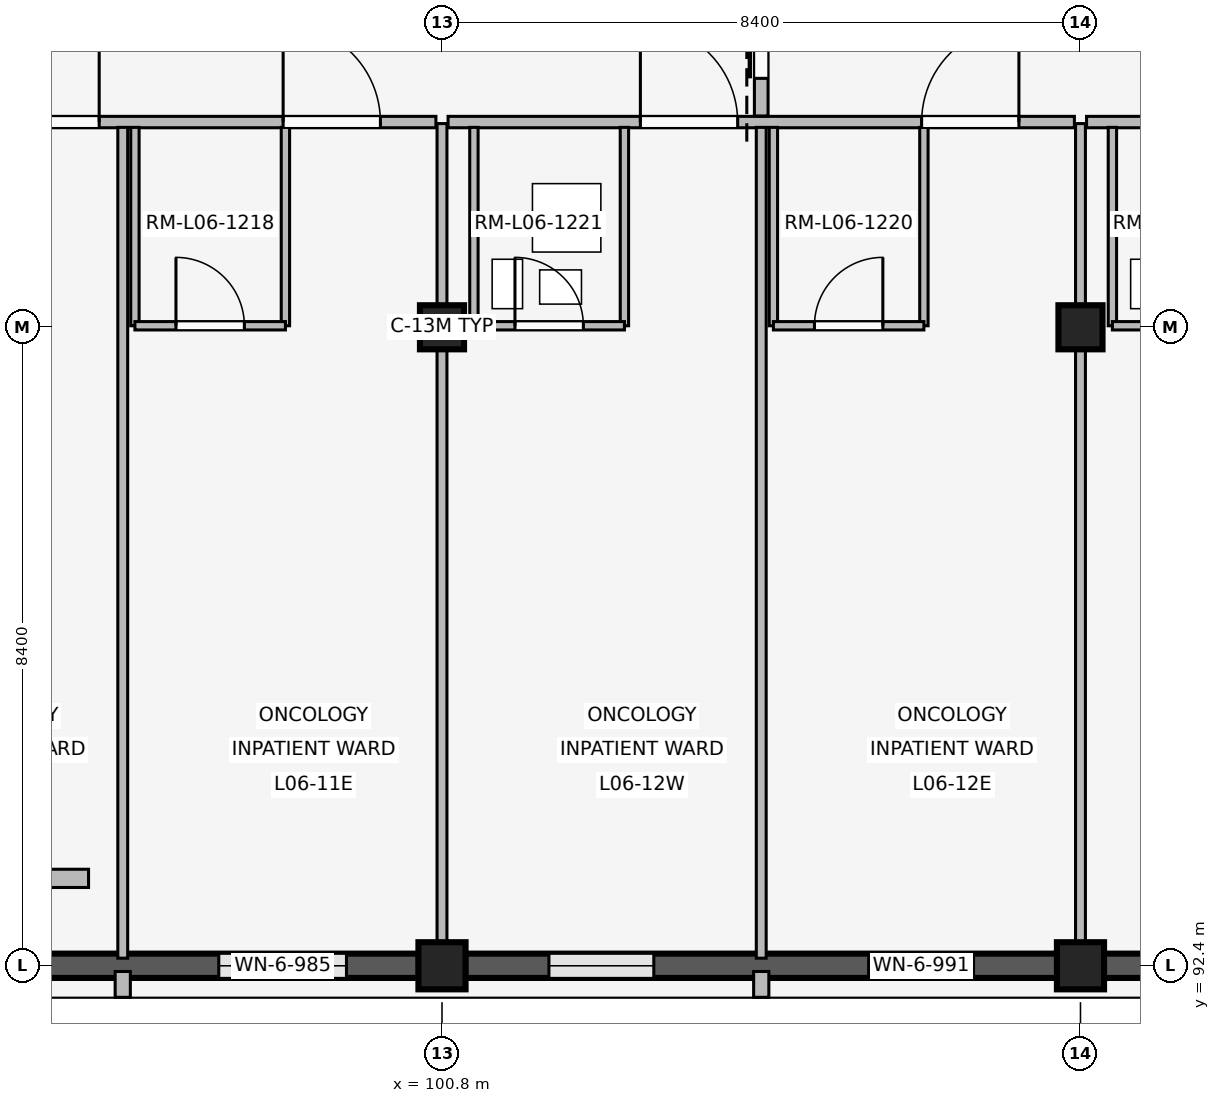
"""IFC4 building model, lengths in metres.
Left out: names, types, materials, properties, quantities, classifications, styles, units other than length and angle.
Written with IfcOpenShell. Run it as: python <this file> out.ifc"""

import sys

from ifc_helpers import new_model, si_unit, direction, frame, frame_2d, origin, origin_2d, place, context, subcontext, project, spatial, rectangle, extrude, element, fill, save


model = new_model("IFC4")
c1 = context("Model", 3, precision=1e-05, world=origin(), true_north=direction((0.0, 1.0)))
c2 = subcontext(c1, "Body", "Model", "MODEL_VIEW")
j1 = project(units=[si_unit("LENGTHUNIT", "METRE"), si_unit("PLANEANGLEUNIT", "RADIAN")], contexts=[c1])
p1 = place(None, origin())
s1 = spatial("IfcSite", under=j1, at=p1, CompositionType="ELEMENT")
p2 = place(p1, origin())
s2 = spatial("IfcBuilding", under=s1, at=p2, CompositionType="ELEMENT")
p3 = place(p2, frame((0.0, 0.0, 24.6)))
s3 = spatial("IfcBuildingStorey", under=s2, at=p3, CompositionType="ELEMENT", Elevation=24.6)
p4 = place(p3, frame((100.8, 92.4, 0.0), z_axis=(0.0, 0.0, 1.0), x_axis=(1.0, 0.0, 0.0)))
e1 = element("IfcColumn", 1, at=p4, inside=s3, PredefinedType="COLUMN", context=c2, shape_type="SweptSolid", body=[
    extrude(rectangle(XDim=0.62, YDim=0.62, at=origin_2d()), origin(), (0.0, 0.0, 1.0), 4.2),
])
p5 = place(p3, frame((100.8, 100.8, 0.0), z_axis=(0.0, 0.0, 1.0), x_axis=(1.0, 0.0, 0.0)))
e2 = element("IfcColumn", 2, at=p5, inside=s3, PredefinedType="COLUMN", context=c2, shape_type="SweptSolid", body=[
    extrude(rectangle(XDim=0.58, YDim=0.58, at=origin_2d()), origin(), (0.0, 0.0, 1.0), 4.2),
])
p6 = place(p3, frame((109.2, 92.4, 0.0), z_axis=(0.0, 0.0, 1.0), x_axis=(1.0, 0.0, 0.0)))
e3 = element("IfcColumn", 3, at=p6, inside=s3, PredefinedType="COLUMN", context=c2, shape_type="SweptSolid", body=[
    extrude(rectangle(XDim=0.62, YDim=0.62, at=origin_2d()), origin(), (0.0, 0.0, 1.0), 4.2),
])
p7 = place(p3, frame((109.2, 100.8, 0.0), z_axis=(0.0, 0.0, 1.0), x_axis=(1.0, 0.0, 0.0)))
e4 = element("IfcColumn", 4, at=p7, inside=s3, PredefinedType="COLUMN", context=c2, shape_type="SweptSolid", body=[
    extrude(rectangle(XDim=0.58, YDim=0.58, at=origin_2d()), origin(), (0.0, 0.0, 1.0), 4.2),
])
p8 = place(p3, frame((100.495, 92.4, 0.0), z_axis=(0.0, 0.0, 1.0), x_axis=(-1.0, 0.0, 0.0)))
e5 = element("IfcWall", 5, at=p8, inside=s3, PredefinedType="SOLIDWALL", context=c2, shape_type="SweptSolid", body=[
    extrude(rectangle(XDim=7.79, YDim=0.32, at=frame_2d((3.895, 0.0))), origin(), (0.0, 0.0, 1.0), 3.34),
])
p9 = place(p8, frame((0.952, 0.0, 0.85)))
e6 = element("IfcOpeningElement", 6, at=p9, cuts=e5, PredefinedType="OPENING", context=c2, shape_type="SweptSolid", body=[
    extrude(rectangle(XDim=1.68, YDim=2.05, at=frame_2d((0.84, 1.025))), frame((0.0, 0.17, 0.0), z_axis=(0.0, -1.0, 0.0), x_axis=(1.0, 0.0, 0.0)), (0.0, 0.0, 1.0), 0.34),
])
p10 = place(p8, frame((5.158, 0.0, 0.85)))
e7 = element("IfcOpeningElement", 7, at=p10, cuts=e5, PredefinedType="OPENING", context=c2, shape_type="SweptSolid", body=[
    extrude(rectangle(XDim=1.68, YDim=2.05, at=frame_2d((0.84, 1.025))), frame((0.0, 0.17, 0.0), z_axis=(0.0, -1.0, 0.0), x_axis=(1.0, 0.0, 0.0)), (0.0, 0.0, 1.0), 0.34),
])
p11 = place(p3, frame((96.6, 92.325, 0.0), z_axis=(0.0, 0.0, 1.0), x_axis=(0.0, -1.0, 0.0)))
e8 = element("IfcWall", 8, at=p11, inside=s3, PredefinedType="ELEMENTEDWALL", context=c2, shape_type="SweptSolid", body=[
    extrude(rectangle(XDim=0.34, YDim=0.2, at=frame_2d((0.17, 0.0))), origin(), (0.0, 0.0, 1.0), 3.32),
])
p12 = place(p3, frame((108.895, 92.4, 0.0), z_axis=(0.0, 0.0, 1.0), x_axis=(-1.0, 0.0, 0.0)))
e9 = element("IfcWall", 9, at=p12, inside=s3, PredefinedType="SOLIDWALL", context=c2, shape_type="SweptSolid", body=[
    extrude(rectangle(XDim=7.79, YDim=0.32, at=frame_2d((3.895, 0.0))), origin(), (0.0, 0.0, 1.0), 3.34),
])
p13 = place(p12, frame((1.102, 0.0, 0.85)))
e10 = element("IfcOpeningElement", 10, at=p13, cuts=e9, PredefinedType="OPENING", context=c2, shape_type="SweptSolid", body=[
    extrude(rectangle(XDim=1.38, YDim=1.5, at=frame_2d((0.69, 0.75))), frame((0.0, 0.17, 0.0), z_axis=(0.0, -1.0, 0.0), x_axis=(1.0, 0.0, 0.0)), (0.0, 0.0, 1.0), 0.34),
])
p14 = place(p12, frame((5.308, 0.0, 0.85)))
e11 = element("IfcOpeningElement", 11, at=p14, cuts=e9, PredefinedType="OPENING", context=c2, shape_type="SweptSolid", body=[
    extrude(rectangle(XDim=1.38, YDim=1.5, at=frame_2d((0.69, 0.75))), frame((0.0, 0.17, 0.0), z_axis=(0.0, -1.0, 0.0), x_axis=(1.0, 0.0, 0.0)), (0.0, 0.0, 1.0), 0.34),
])
p15 = place(p3, frame((105.0, 92.325, 0.0), z_axis=(0.0, 0.0, 1.0), x_axis=(0.0, -1.0, 0.0)))
e12 = element("IfcWall", 12, at=p15, inside=s3, PredefinedType="ELEMENTEDWALL", context=c2, shape_type="SweptSolid", body=[
    extrude(rectangle(XDim=0.34, YDim=0.2, at=frame_2d((0.17, 0.0))), origin(), (0.0, 0.0, 1.0), 3.32),
])
p16 = place(p3, frame((117.295, 92.4, 0.0), z_axis=(0.0, 0.0, 1.0), x_axis=(-1.0, 0.0, 0.0)))
e13 = element("IfcWall", 13, at=p16, inside=s3, PredefinedType="SOLIDWALL", context=c2, shape_type="SweptSolid", body=[
    extrude(rectangle(XDim=7.79, YDim=0.32, at=frame_2d((3.895, 0.0))), origin(), (0.0, 0.0, 1.0), 3.34),
])
p17 = place(p16, frame((1.012, 0.0, 0.85)))
e14 = element("IfcOpeningElement", 14, at=p17, cuts=e13, PredefinedType="OPENING", context=c2, shape_type="SweptSolid", body=[
    extrude(rectangle(XDim=1.56, YDim=1.7, at=frame_2d((0.78, 0.85))), frame((0.0, 0.17, 0.0), z_axis=(0.0, -1.0, 0.0), x_axis=(1.0, 0.0, 0.0)), (0.0, 0.0, 1.0), 0.34),
])
p18 = place(p16, frame((5.218, 0.0, 0.85)))
e15 = element("IfcOpeningElement", 15, at=p18, cuts=e13, PredefinedType="OPENING", context=c2, shape_type="SweptSolid", body=[
    extrude(rectangle(XDim=1.56, YDim=1.7, at=frame_2d((0.78, 0.85))), frame((0.0, 0.17, 0.0), z_axis=(0.0, -1.0, 0.0), x_axis=(1.0, 0.0, 0.0)), (0.0, 0.0, 1.0), 0.34),
])
p19 = place(p3, frame((92.76, 103.5, 0.0), z_axis=(0.0, 0.0, 1.0), x_axis=(1.0, 0.0, 0.0)))
e16 = element("IfcWall", 16, at=p19, inside=s3, PredefinedType="PARTITIONING", context=c2, shape_type="SweptSolid", body=[
    extrude(rectangle(XDim=7.96, YDim=0.15, at=frame_2d((3.98, 0.0))), origin(), (0.0, 0.0, 1.0), 3.32),
])
p20 = place(p19, frame((2.25, 0.0, 0.0)))
e17 = element("IfcOpeningElement", 17, at=p20, cuts=e16, PredefinedType="OPENING", context=c2, shape_type="SweptSolid", body=[
    extrude(rectangle(XDim=1.28, YDim=2.2, at=frame_2d((0.64, 1.1))), frame((0.0, 0.085, 0.0), z_axis=(0.0, -1.0, 0.0), x_axis=(1.0, 0.0, 0.0)), (0.0, 0.0, 1.0), 0.17),
])
p21 = place(p19, frame((5.95, 0.0, 0.0)))
e18 = element("IfcOpeningElement", 18, at=p21, cuts=e16, PredefinedType="OPENING", context=c2, shape_type="SweptSolid", body=[
    extrude(rectangle(XDim=1.28, YDim=2.2, at=frame_2d((0.64, 1.1))), frame((0.0, 0.085, 0.0), z_axis=(0.0, -1.0, 0.0), x_axis=(1.0, 0.0, 0.0)), (0.0, 0.0, 1.0), 0.17),
])
p22 = place(p3, frame((96.6, 92.5, 0.0), z_axis=(0.0, 0.0, 1.0), x_axis=(0.0, 1.0, 0.0)))
e19 = element("IfcWall", 19, at=p22, inside=s3, PredefinedType="PARTITIONING", context=c2, shape_type="SweptSolid", body=[
    extrude(rectangle(XDim=10.93, YDim=0.13, at=frame_2d((5.465, 0.0))), origin(), (0.0, 0.0, 1.0), 3.32),
])
for number, where, z_axis, x_axis in (
    (20, (96.76, 100.82, 0.0), (0.0, 0.0, 1.0), (0.0, 1.0, 0.0)),
    (21, (98.74, 100.82, 0.0), (0.0, 0.0, 1.0), (0.0, 1.0, 0.0)),
):
    element("IfcWall", number, at=place(p3, frame(where, z_axis=z_axis, x_axis=x_axis)), inside=s3, PredefinedType="PARTITIONING", context=c2, shape_type="SweptSolid", body=[
        extrude(rectangle(XDim=2.61, YDim=0.11, at=frame_2d((1.305, 0.0))), origin(), (0.0, 0.0, 1.0), 3.32),
    ])
p23 = place(p3, frame((96.76, 100.82, 0.0), z_axis=(0.0, 0.0, 1.0), x_axis=(1.0, 0.0, 0.0)))
e22 = element("IfcWall", 22, at=p23, inside=s3, PredefinedType="PARTITIONING", context=c2, shape_type="SweptSolid", body=[
    extrude(rectangle(XDim=1.98, YDim=0.11, at=frame_2d((0.99, 0.0))), origin(), (0.0, 0.0, 1.0), 3.32),
])
p24 = place(p23, frame((0.54, 0.0, 0.0)))
e23 = element("IfcOpeningElement", 23, at=p24, cuts=e22, PredefinedType="OPENING", context=c2, shape_type="SweptSolid", body=[
    extrude(rectangle(XDim=0.9, YDim=2.1, at=frame_2d((0.45, 1.05))), frame((0.0, 0.065, 0.0), z_axis=(0.0, -1.0, 0.0), x_axis=(1.0, 0.0, 0.0)), (0.0, 0.0, 1.0), 0.13),
])
p25 = place(p3, frame((95.25, 93.55, 0.0), z_axis=(0.0, 0.0, 1.0), x_axis=(1.0, 0.0, 0.0)))
e24 = element("IfcWall", 24, at=p25, inside=s3, PredefinedType="PLUMBINGWALL", context=c2, shape_type="SweptSolid", body=[
    extrude(rectangle(XDim=0.9, YDim=0.24, at=frame_2d((0.45, 0.0))), origin(), (0.0, 0.0, 1.0), 3.32),
])
p26 = place(p3, frame((100.8, 92.54, 0.0), z_axis=(0.0, 0.0, 1.0), x_axis=(0.0, 1.0, 0.0)))
e25 = element("IfcWall", 25, at=p26, inside=s3, PredefinedType="PARTITIONING", context=c2, shape_type="SweptSolid", body=[
    extrude(rectangle(XDim=10.94, YDim=0.13, at=frame_2d((5.47, 0.0))), origin(), (0.0, 0.0, 1.0), 3.32),
])
p27 = place(p3, frame((100.88, 103.5, 0.0), z_axis=(0.0, 0.0, 1.0), x_axis=(1.0, 0.0, 0.0)))
e26 = element("IfcWall", 26, at=p27, inside=s3, PredefinedType="PARTITIONING", context=c2, shape_type="SweptSolid", body=[
    extrude(rectangle(XDim=8.24, YDim=0.15, at=frame_2d((4.12, 0.0))), origin(), (0.0, 0.0, 1.0), 3.32),
])
p28 = place(p27, frame((2.53, 0.0, 0.0)))
e27 = element("IfcOpeningElement", 27, at=p28, cuts=e26, PredefinedType="OPENING", context=c2, shape_type="SweptSolid", body=[
    extrude(rectangle(XDim=1.28, YDim=2.2, at=frame_2d((0.64, 1.1))), frame((0.0, 0.085, 0.0), z_axis=(0.0, -1.0, 0.0), x_axis=(1.0, 0.0, 0.0)), (0.0, 0.0, 1.0), 0.17),
])
p29 = place(p27, frame((6.23, 0.0, 0.0)))
e28 = element("IfcOpeningElement", 28, at=p29, cuts=e26, PredefinedType="OPENING", context=c2, shape_type="SweptSolid", body=[
    extrude(rectangle(XDim=1.28, YDim=2.2, at=frame_2d((0.64, 1.1))), frame((0.0, 0.085, 0.0), z_axis=(0.0, -1.0, 0.0), x_axis=(1.0, 0.0, 0.0)), (0.0, 0.0, 1.0), 0.17),
])
p30 = place(p3, frame((105.0, 92.5, 0.0), z_axis=(0.0, 0.0, 1.0), x_axis=(0.0, 1.0, 0.0)))
e29 = element("IfcWall", 29, at=p30, inside=s3, PredefinedType="PARTITIONING", context=c2, shape_type="SweptSolid", body=[
    extrude(rectangle(XDim=10.93, YDim=0.13, at=frame_2d((5.465, 0.0))), origin(), (0.0, 0.0, 1.0), 3.32),
])
for number, where, z_axis, x_axis in (
    (30, (101.22, 100.82, 0.0), (0.0, 0.0, 1.0), (0.0, 1.0, 0.0)),
    (31, (103.2, 100.82, 0.0), (0.0, 0.0, 1.0), (0.0, 1.0, 0.0)),
):
    element("IfcWall", number, at=place(p3, frame(where, z_axis=z_axis, x_axis=x_axis)), inside=s3, PredefinedType="PARTITIONING", context=c2, shape_type="SweptSolid", body=[
        extrude(rectangle(XDim=2.61, YDim=0.11, at=frame_2d((1.305, 0.0))), origin(), (0.0, 0.0, 1.0), 3.32),
    ])
p31 = place(p3, frame((101.22, 100.82, 0.0), z_axis=(0.0, 0.0, 1.0), x_axis=(1.0, 0.0, 0.0)))
e32 = element("IfcWall", 32, at=p31, inside=s3, PredefinedType="PARTITIONING", context=c2, shape_type="SweptSolid", body=[
    extrude(rectangle(XDim=1.98, YDim=0.11, at=frame_2d((0.99, 0.0))), origin(), (0.0, 0.0, 1.0), 3.32),
])
p32 = place(p31, frame((0.54, 0.0, 0.0)))
e33 = element("IfcOpeningElement", 33, at=p32, cuts=e32, PredefinedType="OPENING", context=c2, shape_type="SweptSolid", body=[
    extrude(rectangle(XDim=0.9, YDim=2.1, at=frame_2d((0.45, 1.05))), frame((0.0, 0.065, 0.0), z_axis=(0.0, -1.0, 0.0), x_axis=(1.0, 0.0, 0.0)), (0.0, 0.0, 1.0), 0.13),
])
for number, where, z_axis, x_axis in (
    (34, (105.16, 100.82, 0.0), (0.0, 0.0, 1.0), (0.0, 1.0, 0.0)),
    (35, (107.14, 100.82, 0.0), (0.0, 0.0, 1.0), (0.0, 1.0, 0.0)),
):
    element("IfcWall", number, at=place(p3, frame(where, z_axis=z_axis, x_axis=x_axis)), inside=s3, PredefinedType="PARTITIONING", context=c2, shape_type="SweptSolid", body=[
        extrude(rectangle(XDim=2.61, YDim=0.11, at=frame_2d((1.305, 0.0))), origin(), (0.0, 0.0, 1.0), 3.32),
    ])
p33 = place(p3, frame((105.16, 100.82, 0.0), z_axis=(0.0, 0.0, 1.0), x_axis=(1.0, 0.0, 0.0)))
e36 = element("IfcWall", 36, at=p33, inside=s3, PredefinedType="PARTITIONING", context=c2, shape_type="SweptSolid", body=[
    extrude(rectangle(XDim=1.98, YDim=0.11, at=frame_2d((0.99, 0.0))), origin(), (0.0, 0.0, 1.0), 3.32),
])
p34 = place(p33, frame((0.54, 0.0, 0.0)))
e37 = element("IfcOpeningElement", 37, at=p34, cuts=e36, PredefinedType="OPENING", context=c2, shape_type="SweptSolid", body=[
    extrude(rectangle(XDim=0.9, YDim=2.1, at=frame_2d((0.45, 1.05))), frame((0.0, 0.065, 0.0), z_axis=(0.0, -1.0, 0.0), x_axis=(1.0, 0.0, 0.0)), (0.0, 0.0, 1.0), 0.13),
])
p35 = place(p3, frame((105.0, 103.58, 0.0), z_axis=(0.0, 0.0, 1.0), x_axis=(0.0, 1.0, 0.0)))
e38 = element("IfcWall", 38, at=p35, inside=s3, PredefinedType="PARTITIONING", context=c2, shape_type="SweptSolid", body=[
    extrude(rectangle(XDim=2.84, YDim=0.18, at=frame_2d((1.42, 0.0))), origin(), (0.0, 0.0, 1.0), 3.32),
])
p36 = place(p35, frame((0.495, 0.0, 0.0)))
e39 = element("IfcOpeningElement", 39, at=p36, cuts=e38, PredefinedType="OPENING", context=c2, shape_type="SweptSolid", body=[
    extrude(rectangle(XDim=1.85, YDim=2.3, at=frame_2d((0.925, 1.15))), frame((0.0, 0.1, 0.0), z_axis=(0.0, -1.0, 0.0), x_axis=(1.0, 0.0, 0.0)), (0.0, 0.0, 1.0), 0.2),
])
p37 = place(p3, frame((109.2, 92.54, 0.0), z_axis=(0.0, 0.0, 1.0), x_axis=(0.0, 1.0, 0.0)))
e40 = element("IfcWall", 40, at=p37, inside=s3, PredefinedType="PARTITIONING", context=c2, shape_type="SweptSolid", body=[
    extrude(rectangle(XDim=10.94, YDim=0.13, at=frame_2d((5.47, 0.0))), origin(), (0.0, 0.0, 1.0), 3.32),
])
p38 = place(p3, frame((109.28, 103.5, 0.0), z_axis=(0.0, 0.0, 1.0), x_axis=(1.0, 0.0, 0.0)))
e41 = element("IfcWall", 41, at=p38, inside=s3, PredefinedType="PARTITIONING", context=c2, shape_type="SweptSolid", body=[
    extrude(rectangle(XDim=8.24, YDim=0.15, at=frame_2d((4.12, 0.0))), origin(), (0.0, 0.0, 1.0), 3.32),
])
p39 = place(p38, frame((2.53, 0.0, 0.0)))
e42 = element("IfcOpeningElement", 42, at=p39, cuts=e41, PredefinedType="OPENING", context=c2, shape_type="SweptSolid", body=[
    extrude(rectangle(XDim=1.28, YDim=2.2, at=frame_2d((0.64, 1.1))), frame((0.0, 0.085, 0.0), z_axis=(0.0, -1.0, 0.0), x_axis=(1.0, 0.0, 0.0)), (0.0, 0.0, 1.0), 0.17),
])
p40 = place(p38, frame((6.23, 0.0, 0.0)))
e43 = element("IfcOpeningElement", 43, at=p40, cuts=e41, PredefinedType="OPENING", context=c2, shape_type="SweptSolid", body=[
    extrude(rectangle(XDim=1.28, YDim=2.2, at=frame_2d((0.64, 1.1))), frame((0.0, 0.085, 0.0), z_axis=(0.0, -1.0, 0.0), x_axis=(1.0, 0.0, 0.0)), (0.0, 0.0, 1.0), 0.17),
])
p41 = place(p3, frame((109.62, 100.82, 0.0), z_axis=(0.0, 0.0, 1.0), x_axis=(0.0, 1.0, 0.0)))
e44 = element("IfcWall", 44, at=p41, inside=s3, PredefinedType="PARTITIONING", context=c2, shape_type="SweptSolid", body=[
    extrude(rectangle(XDim=2.61, YDim=0.11, at=frame_2d((1.305, 0.0))), origin(), (0.0, 0.0, 1.0), 3.32),
])
p42 = place(p3, frame((109.62, 100.82, 0.0), z_axis=(0.0, 0.0, 1.0), x_axis=(1.0, 0.0, 0.0)))
e45 = element("IfcWall", 45, at=p42, inside=s3, PredefinedType="PARTITIONING", context=c2, shape_type="SweptSolid", body=[
    extrude(rectangle(XDim=1.98, YDim=0.11, at=frame_2d((0.99, 0.0))), origin(), (0.0, 0.0, 1.0), 3.32),
])
p43 = place(p42, frame((0.54, 0.0, 0.0)))
e46 = element("IfcOpeningElement", 46, at=p43, cuts=e45, PredefinedType="OPENING", context=c2, shape_type="SweptSolid", body=[
    extrude(rectangle(XDim=0.9, YDim=2.1, at=frame_2d((0.45, 1.05))), frame((0.0, 0.065, 0.0), z_axis=(0.0, -1.0, 0.0), x_axis=(1.0, 0.0, 0.0)), (0.0, 0.0, 1.0), 0.13),
])
p44 = place(p9, origin())
e47 = element("IfcWindow", 47, at=p44, inside=s3, PartitioningType="SINGLE_PANEL", PredefinedType="WINDOW", context=c2, shape_type="SweptSolid", body=[
    extrude(rectangle(XDim=1.68, YDim=2.05, at=frame_2d((0.84, 1.025))), frame((0.0, 0.03, 0.0), z_axis=(0.0, -1.0, 0.0), x_axis=(1.0, 0.0, 0.0)), (0.0, 0.0, 1.0), 0.06),
])
fill(e6, e47)
p45 = place(p13, origin())
e48 = element("IfcWindow", 48, at=p45, inside=s3, PartitioningType="SINGLE_PANEL", PredefinedType="WINDOW", context=c2, shape_type="SweptSolid", body=[
    extrude(rectangle(XDim=1.38, YDim=1.5, at=frame_2d((0.69, 0.75))), frame((0.0, 0.03, 0.0), z_axis=(0.0, -1.0, 0.0), x_axis=(1.0, 0.0, 0.0)), (0.0, 0.0, 1.0), 0.06),
])
fill(e10, e48)
p46 = place(p14, origin())
e49 = element("IfcWindow", 49, at=p46, inside=s3, PartitioningType="SINGLE_PANEL", PredefinedType="WINDOW", context=c2, shape_type="SweptSolid", body=[
    extrude(rectangle(XDim=1.38, YDim=1.5, at=frame_2d((0.69, 0.75))), frame((0.0, 0.03, 0.0), z_axis=(0.0, -1.0, 0.0), x_axis=(1.0, 0.0, 0.0)), (0.0, 0.0, 1.0), 0.06),
])
fill(e11, e49)
p47 = place(p20, origin())
e50 = element("IfcDoor", 50, at=p47, inside=s3, OperationType="SINGLE_SWING_RIGHT", PredefinedType="DOOR", context=c2, shape_type="SweptSolid", body=[
    extrude(rectangle(XDim=1.28, YDim=2.2, at=frame_2d((0.64, 1.1))), frame((0.0, 0.025, 0.0), z_axis=(0.0, -1.0, 0.0), x_axis=(1.0, 0.0, 0.0)), (0.0, 0.0, 1.0), 0.05),
])
fill(e17, e50)
p48 = place(p21, origin())
e51 = element("IfcDoor", 51, at=p48, inside=s3, OperationType="SINGLE_SWING_LEFT", PredefinedType="DOOR", context=c2, shape_type="SweptSolid", body=[
    extrude(rectangle(XDim=1.28, YDim=2.2, at=frame_2d((0.64, 1.1))), frame((0.0, 0.025, 0.0), z_axis=(0.0, -1.0, 0.0), x_axis=(1.0, 0.0, 0.0)), (0.0, 0.0, 1.0), 0.05),
])
fill(e18, e51)
p49 = place(p24, origin())
e52 = element("IfcDoor", 52, at=p49, inside=s3, OperationType="SINGLE_SWING_LEFT", PredefinedType="DOOR", context=c2, shape_type="SweptSolid", body=[
    extrude(rectangle(XDim=0.9, YDim=2.1, at=frame_2d((0.45, 1.05))), frame((0.0, 0.025, 0.0), z_axis=(0.0, -1.0, 0.0), x_axis=(1.0, 0.0, 0.0)), (0.0, 0.0, 1.0), 0.05),
])
fill(e23, e52)
p50 = place(p28, origin())
e53 = element("IfcDoor", 53, at=p50, inside=s3, OperationType="SINGLE_SWING_LEFT", PredefinedType="DOOR", context=c2, shape_type="SweptSolid", body=[
    extrude(rectangle(XDim=1.28, YDim=2.2, at=frame_2d((0.64, 1.1))), frame((0.0, 0.025, 0.0), z_axis=(0.0, -1.0, 0.0), x_axis=(1.0, 0.0, 0.0)), (0.0, 0.0, 1.0), 0.05),
])
fill(e27, e53)
p51 = place(p29, origin())
e54 = element("IfcDoor", 54, at=p51, inside=s3, OperationType="SINGLE_SWING_RIGHT", PredefinedType="DOOR", context=c2, shape_type="SweptSolid", body=[
    extrude(rectangle(XDim=1.28, YDim=2.2, at=frame_2d((0.64, 1.1))), frame((0.0, 0.025, 0.0), z_axis=(0.0, -1.0, 0.0), x_axis=(1.0, 0.0, 0.0)), (0.0, 0.0, 1.0), 0.05),
])
fill(e28, e54)
p52 = place(p32, origin())
e55 = element("IfcDoor", 55, at=p52, inside=s3, OperationType="SINGLE_SWING_LEFT", PredefinedType="DOOR", context=c2, shape_type="SweptSolid", body=[
    extrude(rectangle(XDim=0.9, YDim=2.1, at=frame_2d((0.45, 1.05))), frame((0.0, 0.025, 0.0), z_axis=(0.0, -1.0, 0.0), x_axis=(1.0, 0.0, 0.0)), (0.0, 0.0, 1.0), 0.05),
])
fill(e33, e55)
p53 = place(p34, origin())
e56 = element("IfcDoor", 56, at=p53, inside=s3, OperationType="SINGLE_SWING_RIGHT", PredefinedType="DOOR", context=c2, shape_type="SweptSolid", body=[
    extrude(rectangle(XDim=0.9, YDim=2.1, at=frame_2d((0.45, 1.05))), frame((0.0, 0.025, 0.0), z_axis=(0.0, -1.0, 0.0), x_axis=(1.0, 0.0, 0.0)), (0.0, 0.0, 1.0), 0.05),
])
fill(e37, e56)
p54 = place(p36, origin())
e57 = element("IfcDoor", 57, at=p54, inside=s3, OperationType="SLIDING_TO_LEFT", PredefinedType="DOOR", context=c2, shape_type="SweptSolid", body=[
    extrude(rectangle(XDim=1.85, YDim=2.3, at=frame_2d((0.925, 1.15))), frame((0.0, 0.025, 0.0), z_axis=(0.0, -1.0, 0.0), x_axis=(1.0, 0.0, 0.0)), (0.0, 0.0, 1.0), 0.05),
])
fill(e39, e57)
save(model, sys.argv[1])
